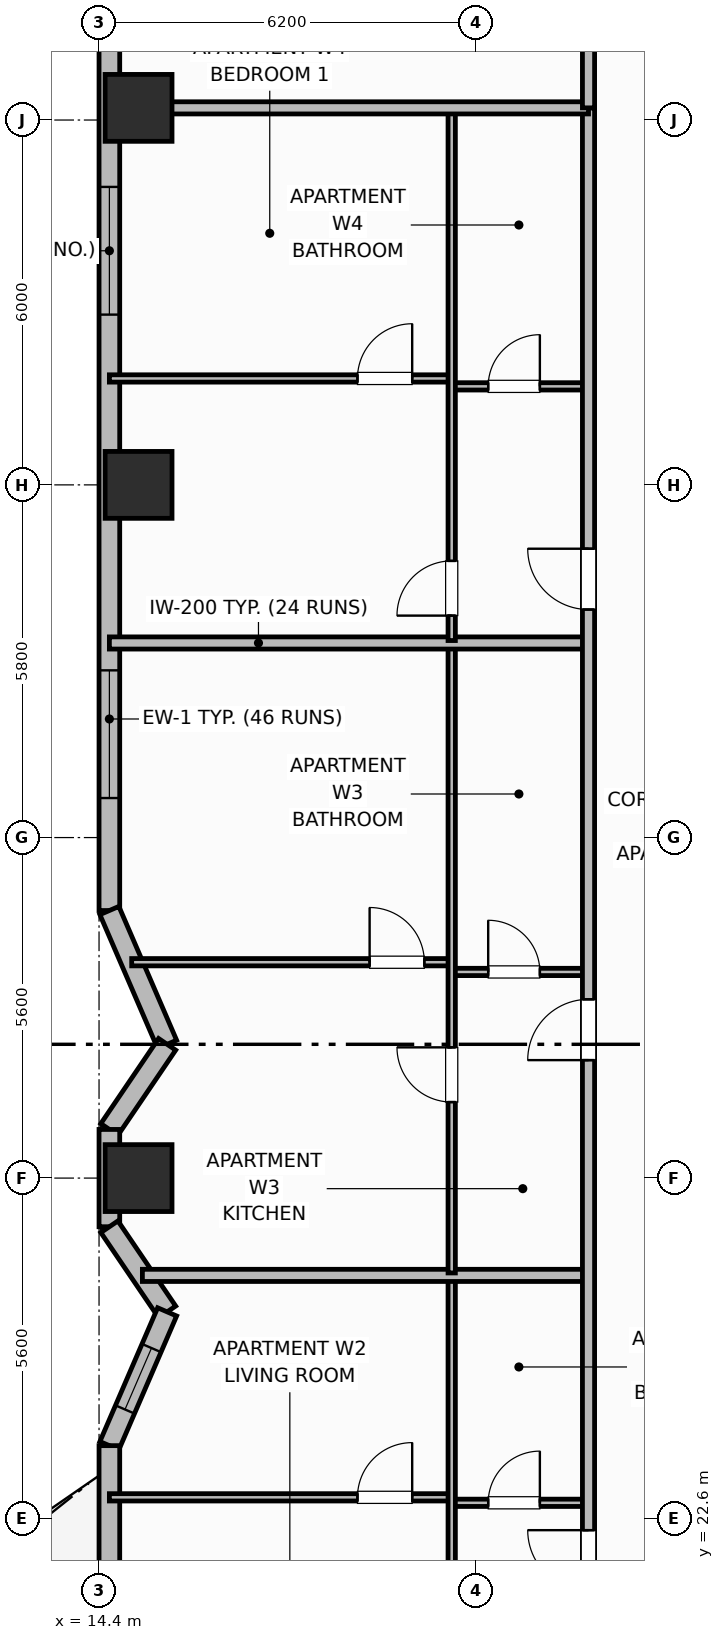
"""IFC4 building model, lengths in metres.
Left out: names, types, materials, properties, quantities, classifications, styles, units other than length and angle.
Written with IfcOpenShell. Run it as: python <this file> out.ifc"""

import sys

from ifc_helpers import new_model, si_unit, direction, frame, frame_2d, origin, origin_2d, place, context, subcontext, project, spatial, rectangle, extrude, element, fill, save


model = new_model("IFC4")
c1 = context("Model", 3, precision=1e-05, world=origin(), true_north=direction((0.0, 1.0)))
c2 = subcontext(c1, "Body", "Model", "MODEL_VIEW")
j1 = project(units=[si_unit("LENGTHUNIT", "METRE"), si_unit("PLANEANGLEUNIT", "RADIAN")], contexts=[c1])
p1 = place(None, origin())
s1 = spatial("IfcSite", under=j1, at=p1, CompositionType="ELEMENT")
p2 = place(p1, origin())
s2 = spatial("IfcBuilding", under=s1, at=p2, CompositionType="ELEMENT")
p3 = place(p2, frame((0.0, 0.0, 103.1)))
s3 = spatial("IfcBuildingStorey", under=s2, at=p3, CompositionType="ELEMENT", Elevation=103.1)
for number, where, z_axis, x_axis in (
    (1, (15.05, 28.2, 0.0), (0.0, 0.0, 1.0), (1.0, 0.0, 0.0)),
    (2, (15.05, 39.6, 0.0), (0.0, 0.0, 1.0), (1.0, 0.0, 0.0)),
    (3, (15.05, 45.8, 0.0), (0.0, 0.0, 1.0), (1.0, 0.0, 0.0)),
):
    element("IfcColumn", number, at=place(p3, frame(where, z_axis=z_axis, x_axis=x_axis)), inside=s3, PredefinedType="COLUMN", context=c2, shape_type="SweptSolid", body=[
        extrude(rectangle(XDim=1.1, YDim=1.1, at=origin_2d()), origin(), (0.0, 0.0, 1.0), 3.7),
    ])
p4 = place(p3, frame((14.57, 47.4, 0.0), z_axis=(0.0, 0.0, 1.0), x_axis=(0.0, -1.0, 0.0)))
e4 = element("IfcWall", 4, at=p4, inside=s3, PredefinedType="SOLIDWALL", context=c2, shape_type="SweptSolid", body=[
    extrude(rectangle(XDim=14.8, YDim=0.34, at=frame_2d((7.4, 0.0))), origin(), (0.0, 0.0, 1.0), 2.7),
])
p5 = place(p4, frame((2.9, 0.0, 0.68)))
e5 = element("IfcOpeningElement", 5, at=p5, cuts=e4, PredefinedType="OPENING", context=c2, shape_type="SweptSolid", body=[
    extrude(rectangle(XDim=2.1, YDim=1.9, at=frame_2d((1.05, 0.95))), frame((0.0, 0.18, 0.0), z_axis=(0.0, -1.0, 0.0), x_axis=(1.0, 0.0, 0.0)), (0.0, 0.0, 1.0), 0.36),
])
p6 = place(p4, frame((10.85, 0.0, 0.68)))
e6 = element("IfcOpeningElement", 6, at=p6, cuts=e4, PredefinedType="OPENING", context=c2, shape_type="SweptSolid", body=[
    extrude(rectangle(XDim=2.1, YDim=1.9, at=frame_2d((1.05, 0.95))), frame((0.0, 0.18, 0.0), z_axis=(0.0, -1.0, 0.0), x_axis=(1.0, 0.0, 0.0)), (0.0, 0.0, 1.0), 0.36),
])
p7 = place(p3, frame((14.57, 32.6, 0.0), z_axis=(0.0, 0.0, 1.0), x_axis=(0.396389181543, -0.918082576218, 0.0)))
e7 = element("IfcWall", 7, at=p7, inside=s3, PredefinedType="SOLIDWALL", context=c2, shape_type="SweptSolid", body=[
    extrude(rectangle(XDim=2.396, YDim=0.34, at=frame_2d((1.198, 0.0))), origin(), (0.0, 0.0, 1.0), 2.7),
])
p8 = place(p3, frame((15.52, 30.4, 0.0), z_axis=(0.0, 0.0, 1.0), x_axis=(-0.561508476251, -0.827470985049, 0.0)))
e8 = element("IfcWall", 8, at=p8, inside=s3, PredefinedType="SOLIDWALL", context=c2, shape_type="SweptSolid", body=[
    extrude(rectangle(XDim=1.692, YDim=0.34, at=frame_2d((0.846, 0.0))), origin(), (0.0, 0.0, 1.0), 2.7),
])
p9 = place(p3, frame((14.57, 29.0, 0.0), z_axis=(0.0, 0.0, 1.0), x_axis=(0.0, -1.0, 0.0)))
e9 = element("IfcWall", 9, at=p9, inside=s3, PredefinedType="SOLIDWALL", context=c2, shape_type="SweptSolid", body=[
    extrude(rectangle(XDim=1.6, YDim=0.34, at=frame_2d((0.8, 0.0))), origin(), (0.0, 0.0, 1.0), 2.7),
])
p10 = place(p3, frame((14.57, 27.4, 0.0), z_axis=(0.0, 0.0, 1.0), x_axis=(0.561508476251, -0.827470985049, 0.0)))
e10 = element("IfcWall", 10, at=p10, inside=s3, PredefinedType="SOLIDWALL", context=c2, shape_type="SweptSolid", body=[
    extrude(rectangle(XDim=1.692, YDim=0.34, at=frame_2d((0.846, 0.0))), origin(), (0.0, 0.0, 1.0), 2.7),
])
p11 = place(p3, frame((15.52, 26.0, 0.0), z_axis=(0.0, 0.0, 1.0), x_axis=(-0.396426258231, -0.918066567186, 0.0)))
e11 = element("IfcWall", 11, at=p11, inside=s3, PredefinedType="SOLIDWALL", context=c2, shape_type="SweptSolid", body=[
    extrude(rectangle(XDim=2.396, YDim=0.34, at=frame_2d((1.198, 0.0))), origin(), (0.0, 0.0, 1.0), 2.7),
])
p12 = place(p11, frame((0.648, 0.0, 0.89)))
e12 = element("IfcOpeningElement", 12, at=p12, cuts=e11, PredefinedType="OPENING", context=c2, shape_type="SweptSolid", body=[
    extrude(rectangle(XDim=1.1, YDim=1.65, at=frame_2d((0.55, 0.825))), frame((0.0, 0.18, 0.0), z_axis=(0.0, -1.0, 0.0), x_axis=(1.0, 0.0, 0.0)), (0.0, 0.0, 1.0), 0.36),
])
p13 = place(p3, frame((14.57, 23.8, 0.0), z_axis=(0.0, 0.0, 1.0), x_axis=(0.0, -1.0, 0.0)))
e13 = element("IfcWall", 13, at=p13, inside=s3, PredefinedType="SOLIDWALL", context=c2, shape_type="SweptSolid", body=[
    extrude(rectangle(XDim=14.8, YDim=0.34, at=frame_2d((7.4, 0.0))), origin(), (0.0, 0.0, 1.0), 2.7),
])
p14 = place(p13, frame((2.1, 0.0, 0.0)))
e14 = element("IfcOpeningElement", 14, at=p14, cuts=e13, PredefinedType="OPENING", context=c2, shape_type="SweptSolid", body=[
    extrude(rectangle(XDim=1.6, YDim=2.1, at=frame_2d((0.8, 1.05))), frame((0.0, 0.18, 0.0), z_axis=(0.0, -1.0, 0.0), x_axis=(1.0, 0.0, 0.0)), (0.0, 0.0, 1.0), 0.36),
])
p15 = place(p13, frame((4.96, 0.0, 0.69)))
e15 = element("IfcOpeningElement", 15, at=p15, cuts=e13, PredefinedType="OPENING", context=c2, shape_type="SweptSolid", body=[
    extrude(rectangle(XDim=1.4, YDim=1.85, at=frame_2d((0.7, 0.925))), frame((0.0, 0.18, 0.0), z_axis=(0.0, -1.0, 0.0), x_axis=(1.0, 0.0, 0.0)), (0.0, 0.0, 1.0), 0.36),
])
p16 = place(p13, frame((9.238, 0.0, 0.73)))
e16 = element("IfcOpeningElement", 16, at=p16, cuts=e13, PredefinedType="OPENING", context=c2, shape_type="SweptSolid", body=[
    extrude(rectangle(XDim=1.8, YDim=1.85, at=frame_2d((0.9, 0.925))), frame((0.0, 0.18, 0.0), z_axis=(0.0, -1.0, 0.0), x_axis=(1.0, 0.0, 0.0)), (0.0, 0.0, 1.0), 0.36),
])
p17 = place(p3, frame((20.2, 22.86, 0.0), z_axis=(0.0, 0.0, 1.0), x_axis=(1.0, 0.0, 0.0)))
e17 = element("IfcWall", 17, at=p17, inside=s3, PredefinedType="PARTITIONING", context=c2, shape_type="SweptSolid", body=[
    extrude(rectangle(XDim=2.25, YDim=0.12, at=frame_2d((1.125, 0.0))), origin(), (0.0, 0.0, 1.0), 2.53),
])
p18 = place(p17, frame((0.6, 0.0, 0.0)))
e18 = element("IfcOpeningElement", 18, at=p18, cuts=e17, PredefinedType="OPENING", context=c2, shape_type="SweptSolid", body=[
    extrude(rectangle(XDim=0.85, YDim=2.1, at=frame_2d((0.425, 1.05))), frame((0.0, 0.07, 0.0), z_axis=(0.0, -1.0, 0.0), x_axis=(1.0, 0.0, 0.0)), (0.0, 0.0, 1.0), 0.14),
])
p19 = place(p3, frame((14.57, 22.95, 0.0), z_axis=(0.0, 0.0, 1.0), x_axis=(1.0, 0.0, 0.0)))
e19 = element("IfcWall", 19, at=p19, inside=s3, PredefinedType="PARTITIONING", context=c2, shape_type="SweptSolid", body=[
    extrude(rectangle(XDim=5.63, YDim=0.12, at=frame_2d((2.815, 0.0))), origin(), (0.0, 0.0, 1.0), 2.53),
])
p20 = place(p19, frame((4.08, 0.0, 0.0)))
e20 = element("IfcOpeningElement", 20, at=p20, cuts=e19, PredefinedType="OPENING", context=c2, shape_type="SweptSolid", body=[
    extrude(rectangle(XDim=0.9, YDim=2.1, at=frame_2d((0.45, 1.05))), frame((0.0, 0.07, 0.0), z_axis=(0.0, -1.0, 0.0), x_axis=(1.0, 0.0, 0.0)), (0.0, 0.0, 1.0), 0.14),
])
p21 = place(p3, frame((20.2, 19.44, 0.0), z_axis=(0.0, 0.0, 1.0), x_axis=(0.0, 1.0, 0.0)))
e21 = element("IfcWall", 21, at=p21, inside=s3, PredefinedType="PARTITIONING", context=c2, shape_type="SweptSolid", body=[
    extrude(rectangle(XDim=7.12, YDim=0.12, at=frame_2d((3.56, 0.0))), origin(), (0.0, 0.0, 1.0), 2.53),
])
p22 = place(p21, frame((0.41, 0.0, 0.0)))
e22 = element("IfcOpeningElement", 22, at=p22, cuts=e21, PredefinedType="OPENING", context=c2, shape_type="SweptSolid", body=[
    extrude(rectangle(XDim=0.9, YDim=2.1, at=frame_2d((0.45, 1.05))), frame((0.0, 0.07, 0.0), z_axis=(0.0, -1.0, 0.0), x_axis=(1.0, 0.0, 0.0)), (0.0, 0.0, 1.0), 0.14),
])
p23 = place(p3, frame((15.113, 26.6, 0.0), z_axis=(0.0, 0.0, 1.0), x_axis=(1.0, 0.0, 0.0)))
e23 = element("IfcWall", 23, at=p23, inside=s3, PredefinedType="PARTITIONING", context=c2, shape_type="SweptSolid", body=[
    extrude(rectangle(XDim=7.337, YDim=0.2, at=frame_2d((3.668, 0.0))), origin(), (0.0, 0.0, 1.0), 2.53),
])
p24 = place(p3, frame((20.2, 31.59, 0.0), z_axis=(0.0, 0.0, 1.0), x_axis=(1.0, 0.0, 0.0)))
e24 = element("IfcWall", 24, at=p24, inside=s3, PredefinedType="PARTITIONING", context=c2, shape_type="SweptSolid", body=[
    extrude(rectangle(XDim=2.25, YDim=0.12, at=frame_2d((1.125, 0.0))), origin(), (0.0, 0.0, 1.0), 2.53),
])
p25 = place(p24, frame((0.6, 0.0, 0.0)))
e25 = element("IfcOpeningElement", 25, at=p25, cuts=e24, PredefinedType="OPENING", context=c2, shape_type="SweptSolid", body=[
    extrude(rectangle(XDim=0.85, YDim=2.1, at=frame_2d((0.425, 1.05))), frame((0.0, 0.07, 0.0), z_axis=(0.0, -1.0, 0.0), x_axis=(1.0, 0.0, 0.0)), (0.0, 0.0, 1.0), 0.14),
])
p26 = place(p3, frame((14.937, 31.75, 0.0), z_axis=(0.0, 0.0, 1.0), x_axis=(1.0, 0.0, 0.0)))
e26 = element("IfcWall", 26, at=p26, inside=s3, PredefinedType="PARTITIONING", context=c2, shape_type="SweptSolid", body=[
    extrude(rectangle(XDim=5.263, YDim=0.12, at=frame_2d((2.631, 0.0))), origin(), (0.0, 0.0, 1.0), 2.53),
])
p27 = place(p26, frame((3.913, 0.0, 0.0)))
e27 = element("IfcOpeningElement", 27, at=p27, cuts=e26, PredefinedType="OPENING", context=c2, shape_type="SweptSolid", body=[
    extrude(rectangle(XDim=0.9, YDim=2.1, at=frame_2d((0.45, 1.05))), frame((0.0, 0.07, 0.0), z_axis=(0.0, -1.0, 0.0), x_axis=(1.0, 0.0, 0.0)), (0.0, 0.0, 1.0), 0.14),
])
p28 = place(p3, frame((20.2, 26.64, 0.0), z_axis=(0.0, 0.0, 1.0), x_axis=(0.0, 1.0, 0.0)))
e28 = element("IfcWall", 28, at=p28, inside=s3, PredefinedType="PARTITIONING", context=c2, shape_type="SweptSolid", body=[
    extrude(rectangle(XDim=10.32, YDim=0.12, at=frame_2d((5.16, 0.0))), origin(), (0.0, 0.0, 1.0), 2.53),
])
p29 = place(p28, frame((2.81, 0.0, 0.0)))
e29 = element("IfcOpeningElement", 29, at=p29, cuts=e28, PredefinedType="OPENING", context=c2, shape_type="SweptSolid", body=[
    extrude(rectangle(XDim=0.9, YDim=2.1, at=frame_2d((0.45, 1.05))), frame((0.0, 0.07, 0.0), z_axis=(0.0, -1.0, 0.0), x_axis=(1.0, 0.0, 0.0)), (0.0, 0.0, 1.0), 0.14),
])
p30 = place(p3, frame((14.57, 37.0, 0.0), z_axis=(0.0, 0.0, 1.0), x_axis=(1.0, 0.0, 0.0)))
e30 = element("IfcWall", 30, at=p30, inside=s3, PredefinedType="PARTITIONING", context=c2, shape_type="SweptSolid", body=[
    extrude(rectangle(XDim=7.88, YDim=0.2, at=frame_2d((3.94, 0.0))), origin(), (0.0, 0.0, 1.0), 2.53),
])
p31 = place(p3, frame((20.2, 41.22, 0.0), z_axis=(0.0, 0.0, 1.0), x_axis=(1.0, 0.0, 0.0)))
e31 = element("IfcWall", 31, at=p31, inside=s3, PredefinedType="PARTITIONING", context=c2, shape_type="SweptSolid", body=[
    extrude(rectangle(XDim=2.25, YDim=0.12, at=frame_2d((1.125, 0.0))), origin(), (0.0, 0.0, 1.0), 2.53),
])
p32 = place(p31, frame((0.6, 0.0, 0.0)))
e32 = element("IfcOpeningElement", 32, at=p32, cuts=e31, PredefinedType="OPENING", context=c2, shape_type="SweptSolid", body=[
    extrude(rectangle(XDim=0.85, YDim=2.1, at=frame_2d((0.425, 1.05))), frame((0.0, 0.07, 0.0), z_axis=(0.0, -1.0, 0.0), x_axis=(1.0, 0.0, 0.0)), (0.0, 0.0, 1.0), 0.14),
])
p33 = place(p3, frame((14.57, 41.35, 0.0), z_axis=(0.0, 0.0, 1.0), x_axis=(1.0, 0.0, 0.0)))
e33 = element("IfcWall", 33, at=p33, inside=s3, PredefinedType="PARTITIONING", context=c2, shape_type="SweptSolid", body=[
    extrude(rectangle(XDim=5.63, YDim=0.12, at=frame_2d((2.815, 0.0))), origin(), (0.0, 0.0, 1.0), 2.53),
])
p34 = place(p33, frame((4.08, 0.0, 0.0)))
e34 = element("IfcOpeningElement", 34, at=p34, cuts=e33, PredefinedType="OPENING", context=c2, shape_type="SweptSolid", body=[
    extrude(rectangle(XDim=0.9, YDim=2.1, at=frame_2d((0.45, 1.05))), frame((0.0, 0.07, 0.0), z_axis=(0.0, -1.0, 0.0), x_axis=(1.0, 0.0, 0.0)), (0.0, 0.0, 1.0), 0.14),
])
p35 = place(p3, frame((20.2, 37.04, 0.0), z_axis=(0.0, 0.0, 1.0), x_axis=(0.0, 1.0, 0.0)))
e35 = element("IfcWall", 35, at=p35, inside=s3, PredefinedType="PARTITIONING", context=c2, shape_type="SweptSolid", body=[
    extrude(rectangle(XDim=8.72, YDim=0.12, at=frame_2d((4.36, 0.0))), origin(), (0.0, 0.0, 1.0), 2.53),
])
p36 = place(p35, frame((0.41, 0.0, 0.0)))
e36 = element("IfcOpeningElement", 36, at=p36, cuts=e35, PredefinedType="OPENING", context=c2, shape_type="SweptSolid", body=[
    extrude(rectangle(XDim=0.9, YDim=2.1, at=frame_2d((0.45, 1.05))), frame((0.0, 0.07, 0.0), z_axis=(0.0, -1.0, 0.0), x_axis=(1.0, 0.0, 0.0)), (0.0, 0.0, 1.0), 0.14),
])
p37 = place(p3, frame((22.45, 10.6, 0.0), z_axis=(0.0, 0.0, 1.0), x_axis=(0.0, 1.0, 0.0)))
e37 = element("IfcWall", 37, at=p37, inside=s3, PredefinedType="PARTITIONING", context=c2, shape_type="SweptSolid", body=[
    extrude(rectangle(XDim=35.2, YDim=0.2, at=frame_2d((17.6, 0.0))), origin(), (0.0, 0.0, 1.0), 2.53),
])
p38 = place(p37, frame((2.65, 0.0, 0.0)))
e38 = element("IfcOpeningElement", 38, at=p38, cuts=e37, PredefinedType="OPENING", context=c2, shape_type="SweptSolid", body=[
    extrude(rectangle(XDim=1.0, YDim=2.15, at=frame_2d((0.5, 1.075))), frame((0.0, 0.11, 0.0), z_axis=(0.0, -1.0, 0.0), x_axis=(1.0, 0.0, 0.0)), (0.0, 0.0, 1.0), 0.22),
])
p39 = place(p37, frame((10.81, 0.0, 0.0)))
e39 = element("IfcOpeningElement", 39, at=p39, cuts=e37, PredefinedType="OPENING", context=c2, shape_type="SweptSolid", body=[
    extrude(rectangle(XDim=1.0, YDim=2.15, at=frame_2d((0.5, 1.075))), frame((0.0, 0.11, 0.0), z_axis=(0.0, -1.0, 0.0), x_axis=(1.0, 0.0, 0.0)), (0.0, 0.0, 1.0), 0.22),
])
p40 = place(p37, frame((19.54, 0.0, 0.0)))
e40 = element("IfcOpeningElement", 40, at=p40, cuts=e37, PredefinedType="OPENING", context=c2, shape_type="SweptSolid", body=[
    extrude(rectangle(XDim=1.0, YDim=2.15, at=frame_2d((0.5, 1.075))), frame((0.0, 0.11, 0.0), z_axis=(0.0, -1.0, 0.0), x_axis=(1.0, 0.0, 0.0)), (0.0, 0.0, 1.0), 0.22),
])
p41 = place(p37, frame((26.95, 0.0, 0.0)))
e41 = element("IfcOpeningElement", 41, at=p41, cuts=e37, PredefinedType="OPENING", context=c2, shape_type="SweptSolid", body=[
    extrude(rectangle(XDim=1.0, YDim=2.15, at=frame_2d((0.5, 1.075))), frame((0.0, 0.11, 0.0), z_axis=(0.0, -1.0, 0.0), x_axis=(1.0, 0.0, 0.0)), (0.0, 0.0, 1.0), 0.22),
])
p42 = place(p3, frame((14.99, 45.8, 0.0), z_axis=(0.0, 0.0, 1.0), x_axis=(1.0, 0.0, 0.0)))
e42 = element("IfcWall", 42, at=p42, inside=s3, PredefinedType="PARTITIONING", context=c2, shape_type="SweptSolid", body=[
    extrude(rectangle(XDim=7.46, YDim=0.2, at=frame_2d((3.73, 0.0))), origin(), (0.0, 0.0, 1.0), 2.53),
])
p43 = place(p3, frame((22.45, 45.8, 0.0), z_axis=(0.0, 0.0, 1.0), x_axis=(0.0, 1.0, 0.0)))
e43 = element("IfcWall", 43, at=p43, inside=s3, PredefinedType="PARTITIONING", context=c2, shape_type="SweptSolid", body=[
    extrude(rectangle(XDim=5.63, YDim=0.2, at=frame_2d((2.815, 0.0))), origin(), (0.0, 0.0, 1.0), 2.53),
])
p44 = place(p5, origin())
e44 = element("IfcWindow", 44, at=p44, inside=s3, PartitioningType="SINGLE_PANEL", PredefinedType="WINDOW", context=c2, shape_type="SweptSolid", body=[
    extrude(rectangle(XDim=2.1, YDim=1.9, at=frame_2d((1.05, 0.95))), frame((0.0, 0.03, 0.0), z_axis=(0.0, -1.0, 0.0), x_axis=(1.0, 0.0, 0.0)), (0.0, 0.0, 1.0), 0.06),
])
fill(e5, e44)
p45 = place(p6, origin())
e45 = element("IfcWindow", 45, at=p45, inside=s3, PartitioningType="SINGLE_PANEL", PredefinedType="WINDOW", context=c2, shape_type="SweptSolid", body=[
    extrude(rectangle(XDim=2.1, YDim=1.9, at=frame_2d((1.05, 0.95))), frame((0.0, 0.03, 0.0), z_axis=(0.0, -1.0, 0.0), x_axis=(1.0, 0.0, 0.0)), (0.0, 0.0, 1.0), 0.06),
])
fill(e6, e45)
p46 = place(p12, origin())
e46 = element("IfcWindow", 46, at=p46, inside=s3, PartitioningType="SINGLE_PANEL", PredefinedType="WINDOW", context=c2, shape_type="SweptSolid", body=[
    extrude(rectangle(XDim=1.1, YDim=1.65, at=frame_2d((0.55, 0.825))), frame((0.0, 0.03, 0.0), z_axis=(0.0, -1.0, 0.0), x_axis=(1.0, 0.0, 0.0)), (0.0, 0.0, 1.0), 0.06),
])
fill(e12, e46)
p47 = place(p18, origin())
e47 = element("IfcDoor", 47, at=p47, inside=s3, OperationType="SINGLE_SWING_RIGHT", PredefinedType="DOOR", context=c2, shape_type="SweptSolid", body=[
    extrude(rectangle(XDim=0.85, YDim=2.1, at=frame_2d((0.425, 1.05))), frame((0.0, 0.025, 0.0), z_axis=(0.0, -1.0, 0.0), x_axis=(1.0, 0.0, 0.0)), (0.0, 0.0, 1.0), 0.05),
])
fill(e18, e47)
p48 = place(p20, origin())
e48 = element("IfcDoor", 48, at=p48, inside=s3, OperationType="SINGLE_SWING_RIGHT", PredefinedType="DOOR", context=c2, shape_type="SweptSolid", body=[
    extrude(rectangle(XDim=0.9, YDim=2.1, at=frame_2d((0.45, 1.05))), frame((0.0, 0.025, 0.0), z_axis=(0.0, -1.0, 0.0), x_axis=(1.0, 0.0, 0.0)), (0.0, 0.0, 1.0), 0.05),
])
fill(e20, e48)
p49 = place(p25, origin())
e49 = element("IfcDoor", 49, at=p49, inside=s3, OperationType="SINGLE_SWING_LEFT", PredefinedType="DOOR", context=c2, shape_type="SweptSolid", body=[
    extrude(rectangle(XDim=0.85, YDim=2.1, at=frame_2d((0.425, 1.05))), frame((0.0, 0.025, 0.0), z_axis=(0.0, -1.0, 0.0), x_axis=(1.0, 0.0, 0.0)), (0.0, 0.0, 1.0), 0.05),
])
fill(e25, e49)
p50 = place(p27, origin())
e50 = element("IfcDoor", 50, at=p50, inside=s3, OperationType="SINGLE_SWING_LEFT", PredefinedType="DOOR", context=c2, shape_type="SweptSolid", body=[
    extrude(rectangle(XDim=0.9, YDim=2.1, at=frame_2d((0.45, 1.05))), frame((0.0, 0.025, 0.0), z_axis=(0.0, -1.0, 0.0), x_axis=(1.0, 0.0, 0.0)), (0.0, 0.0, 1.0), 0.05),
])
fill(e27, e50)
p51 = place(p29, origin())
e51 = element("IfcDoor", 51, at=p51, inside=s3, OperationType="SINGLE_SWING_RIGHT", PredefinedType="DOOR", context=c2, shape_type="SweptSolid", body=[
    extrude(rectangle(XDim=0.9, YDim=2.1, at=frame_2d((0.45, 1.05))), frame((0.0, 0.025, 0.0), z_axis=(0.0, -1.0, 0.0), x_axis=(1.0, 0.0, 0.0)), (0.0, 0.0, 1.0), 0.05),
])
fill(e29, e51)
p52 = place(p32, origin())
e52 = element("IfcDoor", 52, at=p52, inside=s3, OperationType="SINGLE_SWING_RIGHT", PredefinedType="DOOR", context=c2, shape_type="SweptSolid", body=[
    extrude(rectangle(XDim=0.85, YDim=2.1, at=frame_2d((0.425, 1.05))), frame((0.0, 0.025, 0.0), z_axis=(0.0, -1.0, 0.0), x_axis=(1.0, 0.0, 0.0)), (0.0, 0.0, 1.0), 0.05),
])
fill(e32, e52)
p53 = place(p34, origin())
e53 = element("IfcDoor", 53, at=p53, inside=s3, OperationType="SINGLE_SWING_RIGHT", PredefinedType="DOOR", context=c2, shape_type="SweptSolid", body=[
    extrude(rectangle(XDim=0.9, YDim=2.1, at=frame_2d((0.45, 1.05))), frame((0.0, 0.025, 0.0), z_axis=(0.0, -1.0, 0.0), x_axis=(1.0, 0.0, 0.0)), (0.0, 0.0, 1.0), 0.05),
])
fill(e34, e53)
p54 = place(p36, origin())
e54 = element("IfcDoor", 54, at=p54, inside=s3, OperationType="SINGLE_SWING_LEFT", PredefinedType="DOOR", context=c2, shape_type="SweptSolid", body=[
    extrude(rectangle(XDim=0.9, YDim=2.1, at=frame_2d((0.45, 1.05))), frame((0.0, 0.025, 0.0), z_axis=(0.0, -1.0, 0.0), x_axis=(1.0, 0.0, 0.0)), (0.0, 0.0, 1.0), 0.05),
])
fill(e36, e54)
p55 = place(p39, origin())
e55 = element("IfcDoor", 55, at=p55, inside=s3, OperationType="SINGLE_SWING_RIGHT", PredefinedType="DOOR", context=c2, shape_type="SweptSolid", body=[
    extrude(rectangle(XDim=1.0, YDim=2.15, at=frame_2d((0.5, 1.075))), frame((0.0, 0.025, 0.0), z_axis=(0.0, -1.0, 0.0), x_axis=(1.0, 0.0, 0.0)), (0.0, 0.0, 1.0), 0.05),
])
fill(e39, e55)
p56 = place(p40, origin())
e56 = element("IfcDoor", 56, at=p56, inside=s3, OperationType="SINGLE_SWING_LEFT", PredefinedType="DOOR", context=c2, shape_type="SweptSolid", body=[
    extrude(rectangle(XDim=1.0, YDim=2.15, at=frame_2d((0.5, 1.075))), frame((0.0, 0.025, 0.0), z_axis=(0.0, -1.0, 0.0), x_axis=(1.0, 0.0, 0.0)), (0.0, 0.0, 1.0), 0.05),
])
fill(e40, e56)
p57 = place(p41, origin())
e57 = element("IfcDoor", 57, at=p57, inside=s3, OperationType="SINGLE_SWING_RIGHT", PredefinedType="DOOR", context=c2, shape_type="SweptSolid", body=[
    extrude(rectangle(XDim=1.0, YDim=2.15, at=frame_2d((0.5, 1.075))), frame((0.0, 0.025, 0.0), z_axis=(0.0, -1.0, 0.0), x_axis=(1.0, 0.0, 0.0)), (0.0, 0.0, 1.0), 0.05),
])
fill(e41, e57)
save(model, sys.argv[1])
